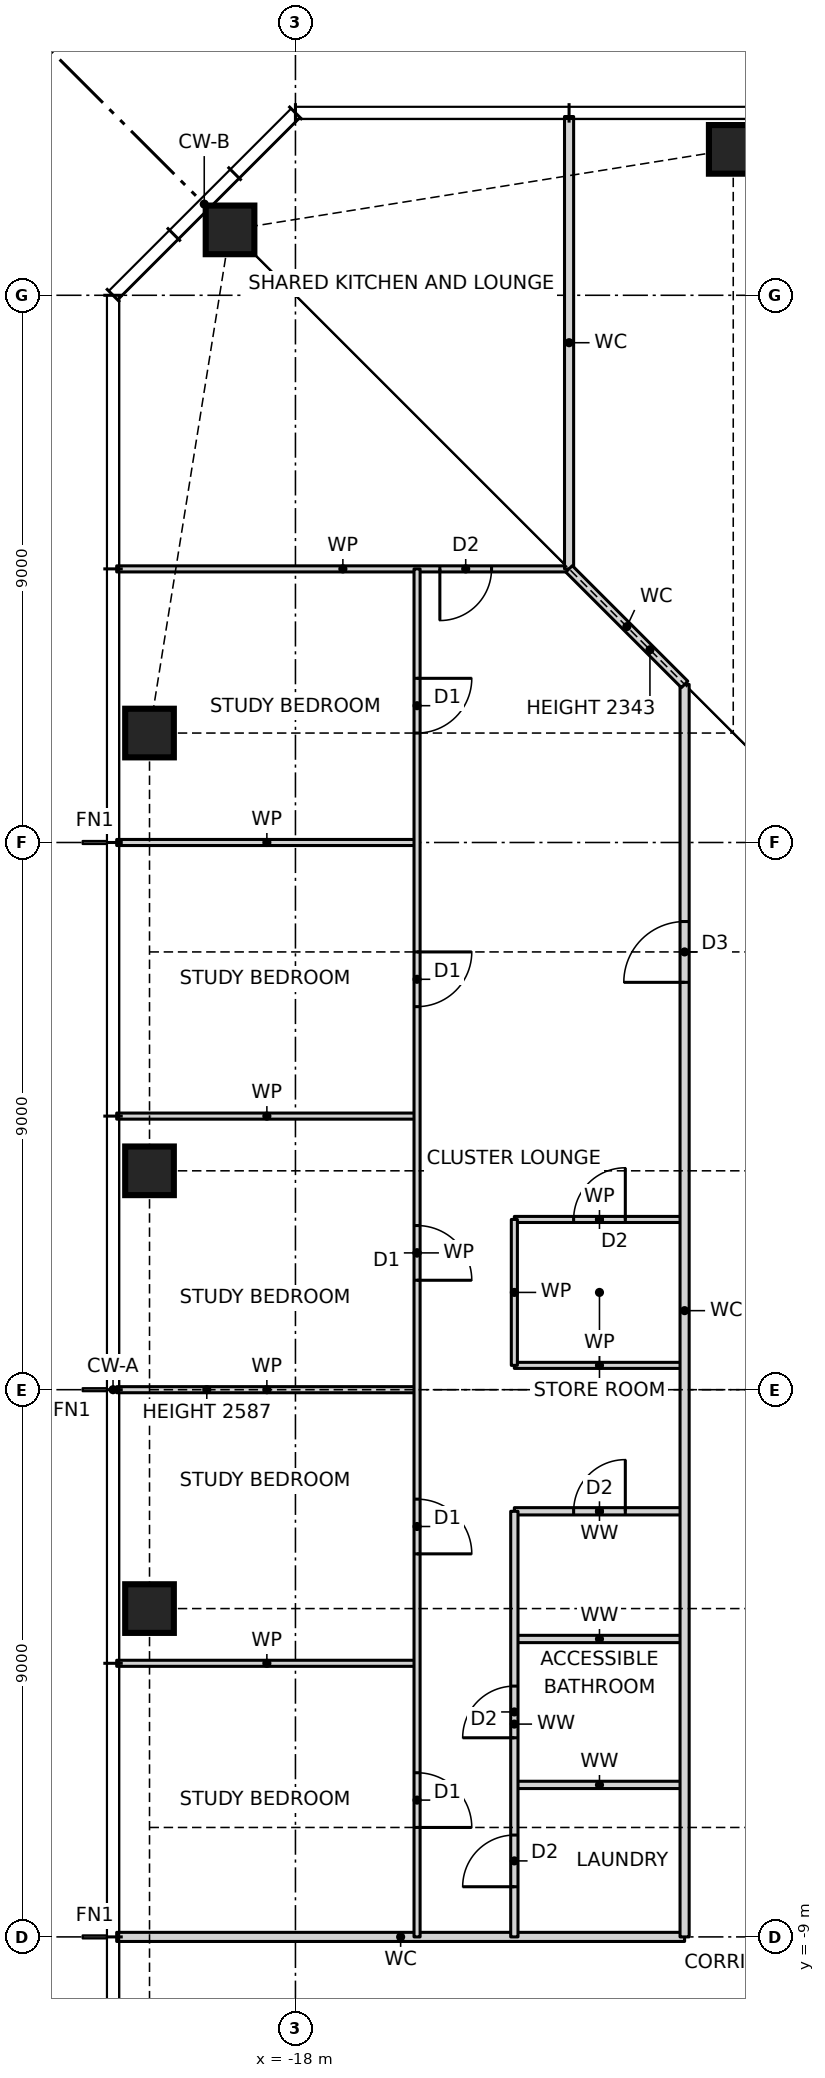
"""IFC4 building model, lengths in metres.
Left out: names, types, materials, properties, quantities, classifications, styles, units other than length and angle.
Written with IfcOpenShell. Run it as: python <this file> out.ifc"""

import sys

from ifc_helpers import new_model, si_unit, direction, frame, frame_2d, origin, origin_2d, place, context, subcontext, project, spatial, rectangle, hollow_rectangle, extrude, element, fill, save


model = new_model("IFC4")
c1 = context("Model", 3, precision=1e-05, world=origin(), true_north=direction((0.0, 1.0)))
c2 = subcontext(c1, "Body", "Model", "MODEL_VIEW")
j1 = project(units=[si_unit("LENGTHUNIT", "METRE"), si_unit("PLANEANGLEUNIT", "RADIAN")], contexts=[c1])
p1 = place(None, origin())
s1 = spatial("IfcSite", under=j1, at=p1, CompositionType="ELEMENT")
p2 = place(p1, origin())
s2 = spatial("IfcBuilding", under=s1, at=p2, CompositionType="ELEMENT")
p3 = place(p2, frame((0.0, 0.0, 87.5)))
s3 = spatial("IfcBuildingStorey", under=s2, at=p3, CompositionType="ELEMENT", Elevation=87.5)
for number, where, z_axis, x_axis in (
    (1, (-10.8, 20.4, 0.0), (0.0, 0.0, 1.0), (1.0, 0.0, 0.0)),
    (2, (-19.076, 19.076, 0.0), (0.0, 0.0, 1.0), (1.0, 0.0, 0.0)),
    (3, (-20.4, 10.8, 0.0), (0.0, 0.0, 1.0), (1.0, 0.0, 0.0)),
    (4, (-20.4, 3.6, 0.0), (0.0, 0.0, 1.0), (1.0, 0.0, 0.0)),
    (5, (-20.4, -3.6, 0.0), (0.0, 0.0, 1.0), (1.0, 0.0, 0.0)),
):
    element("IfcColumn", number, at=place(p3, frame(where, z_axis=z_axis, x_axis=x_axis)), inside=s3, PredefinedType="COLUMN", context=c2, shape_type="SweptSolid", body=[
        extrude(hollow_rectangle(XDim=0.8, YDim=0.8, WallThickness=0.07, at=origin_2d()), origin(), (0.0, 0.0, 1.0), 3.5),
    ])
p4 = place(p3, frame((-20.94, -9.0, 0.0), z_axis=(0.0, 0.0, 1.0), x_axis=(1.0, 0.0, 0.0)))
e6 = element("IfcWall", 6, at=p4, inside=s3, PredefinedType="PARTITIONING", context=c2, shape_type="SweptSolid", body=[
    extrude(rectangle(XDim=9.34, YDim=0.15, at=frame_2d((4.67, 0.0))), origin(), (0.0, 0.0, 1.0), 3.27),
])
p5 = place(p3, frame((-14.4, -6.5, 0.0), z_axis=(0.0, 0.0, 1.0), x_axis=(1.0, 0.0, 0.0)))
e7 = element("IfcWall", 7, at=p5, inside=s3, PredefinedType="PARTITIONING", context=c2, shape_type="SweptSolid", body=[
    extrude(rectangle(XDim=2.8, YDim=0.12, at=frame_2d((1.4, 0.0))), origin(), (0.0, 0.0, 1.0), 3.27),
])
p6 = place(p3, frame((-20.94, -4.5, 0.0), z_axis=(0.0, 0.0, 1.0), x_axis=(1.0, 0.0, 0.0)))
e8 = element("IfcWall", 8, at=p6, inside=s3, PredefinedType="PARTITIONING", context=c2, shape_type="SweptSolid", body=[
    extrude(rectangle(XDim=4.94, YDim=0.1, at=frame_2d((2.47, 0.0))), origin(), (0.0, 0.0, 1.0), 3.27),
])
p7 = place(p3, frame((-14.4, -4.1, 0.0), z_axis=(0.0, 0.0, 1.0), x_axis=(1.0, 0.0, 0.0)))
e9 = element("IfcWall", 9, at=p7, inside=s3, PredefinedType="PARTITIONING", context=c2, shape_type="SweptSolid", body=[
    extrude(rectangle(XDim=2.8, YDim=0.12, at=frame_2d((1.4, 0.0))), origin(), (0.0, 0.0, 1.0), 3.27),
])
p8 = place(p3, frame((-14.4, -2.0, 0.0), z_axis=(0.0, 0.0, 1.0), x_axis=(1.0, 0.0, 0.0)))
e10 = element("IfcWall", 10, at=p8, inside=s3, PredefinedType="PARTITIONING", context=c2, shape_type="SweptSolid", body=[
    extrude(rectangle(XDim=2.8, YDim=0.12, at=frame_2d((1.4, 0.0))), origin(), (0.0, 0.0, 1.0), 3.27),
])
p9 = place(p8, frame((0.975, 0.0, 0.0)))
e11 = element("IfcOpeningElement", 11, at=p9, cuts=e10, PredefinedType="OPENING", context=c2, shape_type="SweptSolid", body=[
    extrude(rectangle(XDim=0.85, YDim=2.1, at=frame_2d((0.425, 1.05))), frame((0.0, 0.07, 0.0), z_axis=(0.0, -1.0, 0.0), x_axis=(1.0, 0.0, 0.0)), (0.0, 0.0, 1.0), 0.14),
])
p10 = place(p3, frame((-20.94, 0.0, 0.0), z_axis=(0.0, 0.0, 1.0), x_axis=(1.0, 0.0, 0.0)))
e12 = element("IfcWall", 12, at=p10, inside=s3, PredefinedType="PARTITIONING", context=c2, shape_type="SweptSolid", body=[
    extrude(rectangle(XDim=4.94, YDim=0.1, at=frame_2d((2.47, 0.0))), origin(), (0.0, 0.0, 1.0), 2.587),
])
p11 = place(p3, frame((-14.4, 0.4, 0.0), z_axis=(0.0, 0.0, 1.0), x_axis=(1.0, 0.0, 0.0)))
e13 = element("IfcWall", 13, at=p11, inside=s3, PredefinedType="PARTITIONING", context=c2, shape_type="SweptSolid", body=[
    extrude(rectangle(XDim=2.8, YDim=0.1, at=frame_2d((1.4, 0.0))), origin(), (0.0, 0.0, 1.0), 3.27),
])
p12 = place(p3, frame((-14.4, 2.8, 0.0), z_axis=(0.0, 0.0, 1.0), x_axis=(1.0, 0.0, 0.0)))
e14 = element("IfcWall", 14, at=p12, inside=s3, PredefinedType="PARTITIONING", context=c2, shape_type="SweptSolid", body=[
    extrude(rectangle(XDim=2.8, YDim=0.1, at=frame_2d((1.4, 0.0))), origin(), (0.0, 0.0, 1.0), 3.27),
])
p13 = place(p12, frame((0.975, 0.0, 0.0)))
e15 = element("IfcOpeningElement", 15, at=p13, cuts=e14, PredefinedType="OPENING", context=c2, shape_type="SweptSolid", body=[
    extrude(rectangle(XDim=0.85, YDim=2.1, at=frame_2d((0.425, 1.05))), frame((0.0, 0.06, 0.0), z_axis=(0.0, -1.0, 0.0), x_axis=(1.0, 0.0, 0.0)), (0.0, 0.0, 1.0), 0.12),
])
for number, where, z_axis, x_axis in (
    (16, (-20.94, 4.5, 0.0), (0.0, 0.0, 1.0), (1.0, 0.0, 0.0)),
    (17, (-20.94, 9.0, 0.0), (0.0, 0.0, 1.0), (1.0, 0.0, 0.0)),
):
    element("IfcWall", number, at=place(p3, frame(where, z_axis=z_axis, x_axis=x_axis)), inside=s3, PredefinedType="PARTITIONING", context=c2, shape_type="SweptSolid", body=[
        extrude(rectangle(XDim=4.94, YDim=0.1, at=frame_2d((2.47, 0.0))), origin(), (0.0, 0.0, 1.0), 3.27),
    ])
p14 = place(p3, frame((-20.94, 13.5, 0.0), z_axis=(0.0, 0.0, 1.0), x_axis=(1.0, 0.0, 0.0)))
e18 = element("IfcWall", 18, at=p14, inside=s3, PredefinedType="PARTITIONING", context=c2, shape_type="SweptSolid", body=[
    extrude(rectangle(XDim=7.44, YDim=0.1, at=frame_2d((3.72, 0.0))), origin(), (0.0, 0.0, 1.0), 3.27),
])
p15 = place(p14, frame((5.315, 0.0, 0.0)))
e19 = element("IfcOpeningElement", 19, at=p15, cuts=e18, PredefinedType="OPENING", context=c2, shape_type="SweptSolid", body=[
    extrude(rectangle(XDim=0.85, YDim=2.1, at=frame_2d((0.425, 1.05))), frame((0.0, 0.06, 0.0), z_axis=(0.0, -1.0, 0.0), x_axis=(1.0, 0.0, 0.0)), (0.0, 0.0, 1.0), 0.12),
])
p16 = place(p3, frame((-11.6, -9.0, 0.0), z_axis=(0.0, 0.0, 1.0), x_axis=(0.0, 1.0, 0.0)))
e20 = element("IfcWall", 20, at=p16, inside=s3, PredefinedType="PARTITIONING", context=c2, shape_type="SweptSolid", body=[
    extrude(rectangle(XDim=20.6, YDim=0.15, at=frame_2d((10.3, 0.0))), origin(), (0.0, 0.0, 1.0), 3.27),
])
p17 = place(p16, frame((15.7, 0.0, 0.0)))
e21 = element("IfcOpeningElement", 21, at=p17, cuts=e20, PredefinedType="OPENING", context=c2, shape_type="SweptSolid", body=[
    extrude(rectangle(XDim=1.0, YDim=2.1, at=frame_2d((0.5, 1.05))), frame((0.0, 0.085, 0.0), z_axis=(0.0, -1.0, 0.0), x_axis=(1.0, 0.0, 0.0)), (0.0, 0.0, 1.0), 0.17),
])
p18 = place(p3, frame((-13.5, 13.5, 0.0), z_axis=(0.0, 0.0, 1.0), x_axis=(0.0, 1.0, 0.0)))
e22 = element("IfcWall", 22, at=p18, inside=s3, PredefinedType="PARTITIONING", context=c2, shape_type="SweptSolid", body=[
    extrude(rectangle(XDim=7.44, YDim=0.15, at=frame_2d((3.72, 0.0))), origin(), (0.0, 0.0, 1.0), 3.27),
])
p19 = place(p3, frame((-14.4, -9.0, 0.0), z_axis=(0.0, 0.0, 1.0), x_axis=(0.0, 1.0, 0.0)))
e23 = element("IfcWall", 23, at=p19, inside=s3, PredefinedType="PARTITIONING", context=c2, shape_type="SweptSolid", body=[
    extrude(rectangle(XDim=7.0, YDim=0.12, at=frame_2d((3.5, 0.0))), origin(), (0.0, 0.0, 1.0), 3.27),
])
p20 = place(p19, frame((3.275, 0.0, 0.0)))
e24 = element("IfcOpeningElement", 24, at=p20, cuts=e23, PredefinedType="OPENING", context=c2, shape_type="SweptSolid", body=[
    extrude(rectangle(XDim=0.85, YDim=2.1, at=frame_2d((0.425, 1.05))), frame((0.0, 0.07, 0.0), z_axis=(0.0, -1.0, 0.0), x_axis=(1.0, 0.0, 0.0)), (0.0, 0.0, 1.0), 0.14),
])
p21 = place(p19, frame((0.825, 0.0, 0.0)))
e25 = element("IfcOpeningElement", 25, at=p21, cuts=e23, PredefinedType="OPENING", context=c2, shape_type="SweptSolid", body=[
    extrude(rectangle(XDim=0.85, YDim=2.1, at=frame_2d((0.425, 1.05))), frame((0.0, 0.07, 0.0), z_axis=(0.0, -1.0, 0.0), x_axis=(1.0, 0.0, 0.0)), (0.0, 0.0, 1.0), 0.14),
])
p22 = place(p3, frame((-14.4, 0.4, 0.0), z_axis=(0.0, 0.0, 1.0), x_axis=(0.0, 1.0, 0.0)))
e26 = element("IfcWall", 26, at=p22, inside=s3, PredefinedType="PARTITIONING", context=c2, shape_type="SweptSolid", body=[
    extrude(rectangle(XDim=2.4, YDim=0.1, at=frame_2d((1.2, 0.0))), origin(), (0.0, 0.0, 1.0), 3.27),
])
p23 = place(p3, frame((-16.0, -9.0, 0.0), z_axis=(0.0, 0.0, 1.0), x_axis=(0.0, 1.0, 0.0)))
e27 = element("IfcWall", 27, at=p23, inside=s3, PredefinedType="PARTITIONING", context=c2, shape_type="SweptSolid", body=[
    extrude(rectangle(XDim=22.5, YDim=0.1, at=frame_2d((11.25, 0.0))), origin(), (0.0, 0.0, 1.0), 3.27),
])
p24 = place(p23, frame((19.8, 0.0, 0.0)))
e28 = element("IfcOpeningElement", 28, at=p24, cuts=e27, PredefinedType="OPENING", context=c2, shape_type="SweptSolid", body=[
    extrude(rectangle(XDim=0.9, YDim=2.1, at=frame_2d((0.45, 1.05))), frame((0.0, 0.06, 0.0), z_axis=(0.0, -1.0, 0.0), x_axis=(1.0, 0.0, 0.0)), (0.0, 0.0, 1.0), 0.12),
])
p25 = place(p23, frame((15.3, 0.0, 0.0)))
e29 = element("IfcOpeningElement", 29, at=p25, cuts=e27, PredefinedType="OPENING", context=c2, shape_type="SweptSolid", body=[
    extrude(rectangle(XDim=0.9, YDim=2.1, at=frame_2d((0.45, 1.05))), frame((0.0, 0.06, 0.0), z_axis=(0.0, -1.0, 0.0), x_axis=(1.0, 0.0, 0.0)), (0.0, 0.0, 1.0), 0.12),
])
p26 = place(p23, frame((10.8, 0.0, 0.0)))
e30 = element("IfcOpeningElement", 30, at=p26, cuts=e27, PredefinedType="OPENING", context=c2, shape_type="SweptSolid", body=[
    extrude(rectangle(XDim=0.9, YDim=2.1, at=frame_2d((0.45, 1.05))), frame((0.0, 0.06, 0.0), z_axis=(0.0, -1.0, 0.0), x_axis=(1.0, 0.0, 0.0)), (0.0, 0.0, 1.0), 0.12),
])
p27 = place(p23, frame((6.3, 0.0, 0.0)))
e31 = element("IfcOpeningElement", 31, at=p27, cuts=e27, PredefinedType="OPENING", context=c2, shape_type="SweptSolid", body=[
    extrude(rectangle(XDim=0.9, YDim=2.1, at=frame_2d((0.45, 1.05))), frame((0.0, 0.06, 0.0), z_axis=(0.0, -1.0, 0.0), x_axis=(1.0, 0.0, 0.0)), (0.0, 0.0, 1.0), 0.12),
])
p28 = place(p23, frame((1.8, 0.0, 0.0)))
e32 = element("IfcOpeningElement", 32, at=p28, cuts=e27, PredefinedType="OPENING", context=c2, shape_type="SweptSolid", body=[
    extrude(rectangle(XDim=0.9, YDim=2.1, at=frame_2d((0.45, 1.05))), frame((0.0, 0.06, 0.0), z_axis=(0.0, -1.0, 0.0), x_axis=(1.0, 0.0, 0.0)), (0.0, 0.0, 1.0), 0.12),
])
p29 = place(p3, frame((-11.6, 11.6, 0.0), z_axis=(0.0, 0.0, 1.0), x_axis=(-0.707106781187, 0.707106781187, 0.0)))
e33 = element("IfcWall", 33, at=p29, inside=s3, PredefinedType="PARTITIONING", context=c2, shape_type="SweptSolid", body=[
    extrude(rectangle(XDim=2.687, YDim=0.15, at=frame_2d((1.343, 0.0))), origin(), (0.0, 0.0, 1.0), 2.343),
])
p30 = place(p24, frame((0.9, 0.0, 0.0), z_axis=(0.0, 0.0, 1.0), x_axis=(-1.0, 0.0, 0.0)))
e34 = element("IfcDoor", 34, at=p30, inside=s3, OperationType="SINGLE_SWING_LEFT", PredefinedType="DOOR", context=c2, shape_type="SweptSolid", body=[
    extrude(rectangle(XDim=0.9, YDim=2.1, at=frame_2d((0.45, 1.05))), frame((0.0, 0.025, 0.0), z_axis=(0.0, -1.0, 0.0), x_axis=(1.0, 0.0, 0.0)), (0.0, 0.0, 1.0), 0.05),
])
fill(e28, e34)
p31 = place(p25, frame((0.9, 0.0, 0.0), z_axis=(0.0, 0.0, 1.0), x_axis=(-1.0, 0.0, 0.0)))
e35 = element("IfcDoor", 35, at=p31, inside=s3, OperationType="SINGLE_SWING_LEFT", PredefinedType="DOOR", context=c2, shape_type="SweptSolid", body=[
    extrude(rectangle(XDim=0.9, YDim=2.1, at=frame_2d((0.45, 1.05))), frame((0.0, 0.025, 0.0), z_axis=(0.0, -1.0, 0.0), x_axis=(1.0, 0.0, 0.0)), (0.0, 0.0, 1.0), 0.05),
])
fill(e29, e35)
p32 = place(p26, frame((0.9, 0.0, 0.0), z_axis=(0.0, 0.0, 1.0), x_axis=(-1.0, 0.0, 0.0)))
e36 = element("IfcDoor", 36, at=p32, inside=s3, OperationType="SINGLE_SWING_RIGHT", PredefinedType="DOOR", context=c2, shape_type="SweptSolid", body=[
    extrude(rectangle(XDim=0.9, YDim=2.1, at=frame_2d((0.45, 1.05))), frame((0.0, 0.025, 0.0), z_axis=(0.0, -1.0, 0.0), x_axis=(1.0, 0.0, 0.0)), (0.0, 0.0, 1.0), 0.05),
])
fill(e30, e36)
p33 = place(p27, frame((0.9, 0.0, 0.0), z_axis=(0.0, 0.0, 1.0), x_axis=(-1.0, 0.0, 0.0)))
e37 = element("IfcDoor", 37, at=p33, inside=s3, OperationType="SINGLE_SWING_RIGHT", PredefinedType="DOOR", context=c2, shape_type="SweptSolid", body=[
    extrude(rectangle(XDim=0.9, YDim=2.1, at=frame_2d((0.45, 1.05))), frame((0.0, 0.025, 0.0), z_axis=(0.0, -1.0, 0.0), x_axis=(1.0, 0.0, 0.0)), (0.0, 0.0, 1.0), 0.05),
])
fill(e31, e37)
p34 = place(p28, frame((0.9, 0.0, 0.0), z_axis=(0.0, 0.0, 1.0), x_axis=(-1.0, 0.0, 0.0)))
e38 = element("IfcDoor", 38, at=p34, inside=s3, OperationType="SINGLE_SWING_RIGHT", PredefinedType="DOOR", context=c2, shape_type="SweptSolid", body=[
    extrude(rectangle(XDim=0.9, YDim=2.1, at=frame_2d((0.45, 1.05))), frame((0.0, 0.025, 0.0), z_axis=(0.0, -1.0, 0.0), x_axis=(1.0, 0.0, 0.0)), (0.0, 0.0, 1.0), 0.05),
])
fill(e32, e38)
p35 = place(p17, origin())
e39 = element("IfcDoor", 39, at=p35, inside=s3, OperationType="SINGLE_SWING_LEFT", PredefinedType="DOOR", context=c2, shape_type="SweptSolid", body=[
    extrude(rectangle(XDim=1.0, YDim=2.1, at=frame_2d((0.5, 1.05))), frame((0.0, 0.025, 0.0), z_axis=(0.0, -1.0, 0.0), x_axis=(1.0, 0.0, 0.0)), (0.0, 0.0, 1.0), 0.05),
])
fill(e21, e39)
p36 = place(p13, origin())
e40 = element("IfcDoor", 40, at=p36, inside=s3, OperationType="SINGLE_SWING_RIGHT", PredefinedType="DOOR", context=c2, shape_type="SweptSolid", body=[
    extrude(rectangle(XDim=0.85, YDim=2.1, at=frame_2d((0.425, 1.05))), frame((0.0, 0.025, 0.0), z_axis=(0.0, -1.0, 0.0), x_axis=(1.0, 0.0, 0.0)), (0.0, 0.0, 1.0), 0.05),
])
fill(e15, e40)
p37 = place(p9, origin())
e41 = element("IfcDoor", 41, at=p37, inside=s3, OperationType="SINGLE_SWING_RIGHT", PredefinedType="DOOR", context=c2, shape_type="SweptSolid", body=[
    extrude(rectangle(XDim=0.85, YDim=2.1, at=frame_2d((0.425, 1.05))), frame((0.0, 0.025, 0.0), z_axis=(0.0, -1.0, 0.0), x_axis=(1.0, 0.0, 0.0)), (0.0, 0.0, 1.0), 0.05),
])
fill(e11, e41)
p38 = place(p20, origin())
e42 = element("IfcDoor", 42, at=p38, inside=s3, OperationType="SINGLE_SWING_LEFT", PredefinedType="DOOR", context=c2, shape_type="SweptSolid", body=[
    extrude(rectangle(XDim=0.85, YDim=2.1, at=frame_2d((0.425, 1.05))), frame((0.0, 0.025, 0.0), z_axis=(0.0, -1.0, 0.0), x_axis=(1.0, 0.0, 0.0)), (0.0, 0.0, 1.0), 0.05),
])
fill(e24, e42)
p39 = place(p21, origin())
e43 = element("IfcDoor", 43, at=p39, inside=s3, OperationType="SINGLE_SWING_LEFT", PredefinedType="DOOR", context=c2, shape_type="SweptSolid", body=[
    extrude(rectangle(XDim=0.85, YDim=2.1, at=frame_2d((0.425, 1.05))), frame((0.0, 0.025, 0.0), z_axis=(0.0, -1.0, 0.0), x_axis=(1.0, 0.0, 0.0)), (0.0, 0.0, 1.0), 0.05),
])
fill(e25, e43)
p40 = place(p15, frame((0.85, 0.0, 0.0), z_axis=(0.0, 0.0, 1.0), x_axis=(-1.0, 0.0, 0.0)))
e44 = element("IfcDoor", 44, at=p40, inside=s3, OperationType="SINGLE_SWING_RIGHT", PredefinedType="DOOR", context=c2, shape_type="SweptSolid", body=[
    extrude(rectangle(XDim=0.85, YDim=2.1, at=frame_2d((0.425, 1.05))), frame((0.0, 0.025, 0.0), z_axis=(0.0, -1.0, 0.0), x_axis=(1.0, 0.0, 0.0)), (0.0, 0.0, 1.0), 0.05),
])
fill(e19, e44)
save(model, sys.argv[1])
